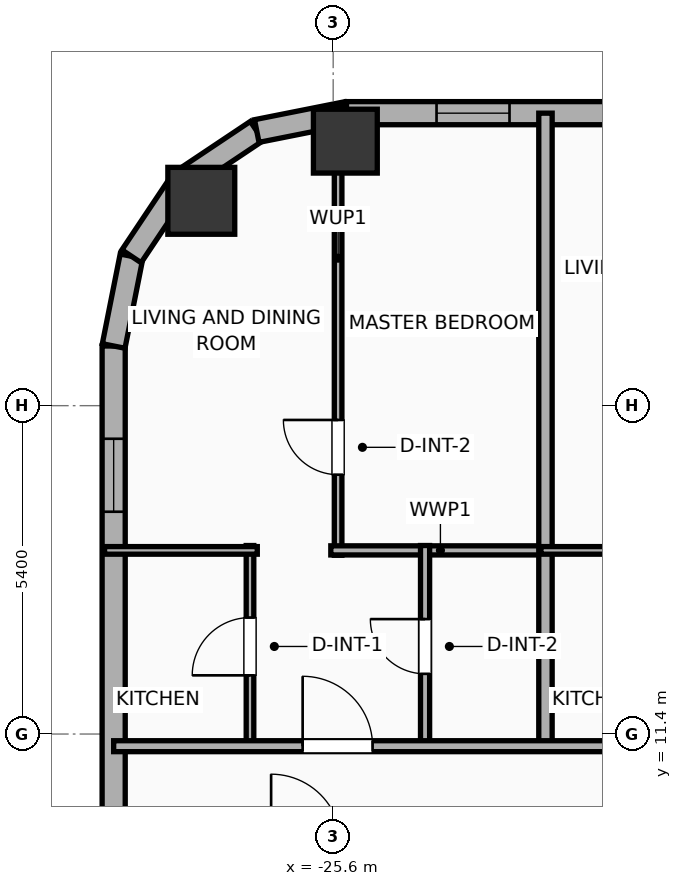
"""IFC4 building model, lengths in metres.
Left out: names, types, materials, properties, quantities, classifications, styles, units other than length and angle.
Written with IfcOpenShell. Run it as: python <this file> out.ifc"""

import sys

from ifc_helpers import new_model, si_unit, direction, frame, frame_2d, origin, origin_2d, place, context, subcontext, project, spatial, rectangle, hollow_rectangle, hollow_circle, extrude, element, fill, save


model = new_model("IFC4")
c1 = context("Model", 3, precision=1e-05, world=origin(), true_north=direction((0.0, 1.0)))
c2 = subcontext(c1, "Body", "Model", "MODEL_VIEW")
j1 = project(units=[si_unit("LENGTHUNIT", "METRE"), si_unit("PLANEANGLEUNIT", "RADIAN")], contexts=[c1])
p1 = place(None, origin())
s1 = spatial("IfcSite", under=j1, at=p1, CompositionType="ELEMENT")
p2 = place(p1, origin())
s2 = spatial("IfcBuilding", under=s1, at=p2, CompositionType="ELEMENT")
p3 = place(p2, frame((0.0, 0.0, 120.9)))
s3 = spatial("IfcBuildingStorey", under=s2, at=p3, CompositionType="ELEMENT", Elevation=120.9)
p4 = place(p3, frame((-25.4, 21.15, 0.0), z_axis=(0.0, 0.0, 1.0), x_axis=(1.0, 0.0, 0.0)))
e1 = element("IfcColumn", 1, at=p4, inside=s3, PredefinedType="COLUMN", context=c2, shape_type="SweptSolid", body=[
    extrude(hollow_rectangle(XDim=1.05, YDim=1.05, WallThickness=0.036, at=origin_2d()), origin(), (0.0, 0.0, 1.0), 3.9),
])
p5 = place(p3, frame((-27.769, 20.169, 0.0), z_axis=(0.0, 0.0, 1.0), x_axis=(1.0, 0.0, 0.0)))
e2 = element("IfcColumn", 2, at=p5, inside=s3, PredefinedType="COLUMN", context=c2, shape_type="SweptSolid", body=[
    extrude(hollow_circle(Radius=0.55, WallThickness=0.036, at=origin_2d()), origin(), (0.0, 0.0, 1.0), 3.9),
])
p6 = place(p3, frame((-29.21, -16.581, 0.0), z_axis=(0.0, 0.0, 1.0), x_axis=(0.0, 1.0, 0.0)))
e3 = element("IfcWall", 3, at=p6, inside=s3, PredefinedType="ELEMENTEDWALL", context=c2, shape_type="SweptSolid", body=[
    extrude(rectangle(XDim=34.363, YDim=0.38, at=frame_2d((17.181, 0.0))), origin(), (0.0, 0.0, 1.0), 3.65),
])
p7 = place(p6, frame((31.637, 0.0, 0.75)))
e4 = element("IfcOpeningElement", 4, at=p7, cuts=e3, PredefinedType="OPENING", context=c2, shape_type="SweptSolid", body=[
    extrude(rectangle(XDim=1.2, YDim=2.05, at=frame_2d((0.6, 1.025))), frame((0.0, 0.2, 0.0), z_axis=(0.0, -1.0, 0.0), x_axis=(1.0, 0.0, 0.0)), (0.0, 0.0, 1.0), 0.4),
])
p8 = place(p6, frame((20.876, 0.0, 0.75)))
e5 = element("IfcOpeningElement", 5, at=p8, cuts=e3, PredefinedType="OPENING", context=c2, shape_type="SweptSolid", body=[
    extrude(rectangle(XDim=1.2, YDim=2.05, at=frame_2d((0.6, 1.025))), frame((0.0, 0.2, 0.0), z_axis=(0.0, -1.0, 0.0), x_axis=(1.0, 0.0, 0.0)), (0.0, 0.0, 1.0), 0.4),
])
p9 = place(p6, frame((11.226, 0.0, 0.75)))
e6 = element("IfcOpeningElement", 6, at=p9, cuts=e3, PredefinedType="OPENING", context=c2, shape_type="SweptSolid", body=[
    extrude(rectangle(XDim=1.2, YDim=2.05, at=frame_2d((0.6, 1.025))), frame((0.0, 0.2, 0.0), z_axis=(0.0, -1.0, 0.0), x_axis=(1.0, 0.0, 0.0)), (0.0, 0.0, 1.0), 0.4),
])
p10 = place(p3, frame((-29.21, 17.781, 0.0), z_axis=(0.0, 0.0, 1.0), x_axis=(0.195086038585, 0.980786132421, 0.0)))
e7 = element("IfcWall", 7, at=p10, inside=s3, PredefinedType="ELEMENTEDWALL", context=c2, shape_type="SweptSolid", body=[
    extrude(rectangle(XDim=1.504, YDim=0.38, at=frame_2d((0.752, 0.0))), origin(), (0.0, 0.0, 1.0), 3.65),
])
p11 = place(p3, frame((-28.917, 19.257, 0.0), z_axis=(0.0, 0.0, 1.0), x_axis=(0.555610286119, 0.831442848281, 0.0)))
e8 = element("IfcWall", 8, at=p11, inside=s3, PredefinedType="ELEMENTEDWALL", context=c2, shape_type="SweptSolid", body=[
    extrude(rectangle(XDim=1.485, YDim=0.38, at=frame_2d((0.743, 0.0))), origin(), (0.0, 0.0, 1.0), 3.65),
])
p12 = place(p3, frame((-28.091, 20.491, 0.0), z_axis=(0.0, 0.0, 1.0), x_axis=(0.831468045563, 0.555572577804, 0.0)))
e9 = element("IfcWall", 9, at=p12, inside=s3, PredefinedType="ELEMENTEDWALL", context=c2, shape_type="SweptSolid", body=[
    extrude(rectangle(XDim=1.485, YDim=0.38, at=frame_2d((0.742, 0.0))), origin(), (0.0, 0.0, 1.0), 3.65),
])
p13 = place(p3, frame((-26.857, 21.316, 0.0), z_axis=(0.0, 0.0, 1.0), x_axis=(0.980755066645, 0.195242155415, 0.0)))
e10 = element("IfcWall", 10, at=p13, inside=s3, PredefinedType="ELEMENTEDWALL", context=c2, shape_type="SweptSolid", body=[
    extrude(rectangle(XDim=1.504, YDim=0.38, at=frame_2d((0.752, 0.0))), origin(), (0.0, 0.0, 1.0), 3.65),
])
p14 = place(p3, frame((-25.381, 21.61, 0.0), z_axis=(0.0, 0.0, 1.0), x_axis=(1.0, 0.0, 0.0)))
e11 = element("IfcWall", 11, at=p14, inside=s3, PredefinedType="ELEMENTEDWALL", context=c2, shape_type="SweptSolid", body=[
    extrude(rectangle(XDim=54.763, YDim=0.38, at=frame_2d((27.381, 0.0))), origin(), (0.0, 0.0, 1.0), 3.65),
])
p15 = place(p14, frame((7.295, 0.0, 0.75)))
e12 = element("IfcOpeningElement", 12, at=p15, cuts=e11, PredefinedType="OPENING", context=c2, shape_type="SweptSolid", body=[
    extrude(rectangle(XDim=2.4, YDim=2.1, at=frame_2d((1.2, 1.05))), frame((0.0, 0.2, 0.0), z_axis=(0.0, -1.0, 0.0), x_axis=(1.0, 0.0, 0.0)), (0.0, 0.0, 1.0), 0.4),
])
p16 = place(p14, frame((17.686, 0.0, 0.75)))
e13 = element("IfcOpeningElement", 13, at=p16, cuts=e11, PredefinedType="OPENING", context=c2, shape_type="SweptSolid", body=[
    extrude(rectangle(XDim=2.4, YDim=2.1, at=frame_2d((1.2, 1.05))), frame((0.0, 0.2, 0.0), z_axis=(0.0, -1.0, 0.0), x_axis=(1.0, 0.0, 0.0)), (0.0, 0.0, 1.0), 0.4),
])
p17 = place(p14, frame((45.867, 0.0, 0.75)))
e14 = element("IfcOpeningElement", 14, at=p17, cuts=e11, PredefinedType="OPENING", context=c2, shape_type="SweptSolid", body=[
    extrude(rectangle(XDim=2.4, YDim=2.1, at=frame_2d((1.2, 1.05))), frame((0.0, 0.2, 0.0), z_axis=(0.0, -1.0, 0.0), x_axis=(1.0, 0.0, 0.0)), (0.0, 0.0, 1.0), 0.4),
])
p18 = place(p14, frame((1.481, 0.0, 0.75)))
e15 = element("IfcOpeningElement", 15, at=p18, cuts=e11, PredefinedType="OPENING", context=c2, shape_type="SweptSolid", body=[
    extrude(rectangle(XDim=1.2, YDim=2.05, at=frame_2d((0.6, 1.025))), frame((0.0, 0.2, 0.0), z_axis=(0.0, -1.0, 0.0), x_axis=(1.0, 0.0, 0.0)), (0.0, 0.0, 1.0), 0.4),
])
p19 = place(p14, frame((4.522, 0.0, 0.75)))
e16 = element("IfcOpeningElement", 16, at=p19, cuts=e11, PredefinedType="OPENING", context=c2, shape_type="SweptSolid", body=[
    extrude(rectangle(XDim=1.2, YDim=2.05, at=frame_2d((0.6, 1.025))), frame((0.0, 0.2, 0.0), z_axis=(0.0, -1.0, 0.0), x_axis=(1.0, 0.0, 0.0)), (0.0, 0.0, 1.0), 0.4),
])
p20 = place(p14, frame((11.696, 0.0, 0.75)))
e17 = element("IfcOpeningElement", 17, at=p20, cuts=e11, PredefinedType="OPENING", context=c2, shape_type="SweptSolid", body=[
    extrude(rectangle(XDim=1.2, YDim=2.05, at=frame_2d((0.6, 1.025))), frame((0.0, 0.2, 0.0), z_axis=(0.0, -1.0, 0.0), x_axis=(1.0, 0.0, 0.0)), (0.0, 0.0, 1.0), 0.4),
])
p21 = place(p14, frame((15.076, 0.0, 0.75)))
e18 = element("IfcOpeningElement", 18, at=p21, cuts=e11, PredefinedType="OPENING", context=c2, shape_type="SweptSolid", body=[
    extrude(rectangle(XDim=1.2, YDim=2.05, at=frame_2d((0.6, 1.025))), frame((0.0, 0.2, 0.0), z_axis=(0.0, -1.0, 0.0), x_axis=(1.0, 0.0, 0.0)), (0.0, 0.0, 1.0), 0.4),
])
p22 = place(p14, frame((22.676, 0.0, 0.75)))
e19 = element("IfcOpeningElement", 19, at=p22, cuts=e11, PredefinedType="OPENING", context=c2, shape_type="SweptSolid", body=[
    extrude(rectangle(XDim=1.2, YDim=2.05, at=frame_2d((0.6, 1.025))), frame((0.0, 0.2, 0.0), z_axis=(0.0, -1.0, 0.0), x_axis=(1.0, 0.0, 0.0)), (0.0, 0.0, 1.0), 0.4),
])
p23 = place(p14, frame((25.576, 0.0, 0.75)))
e20 = element("IfcOpeningElement", 20, at=p23, cuts=e11, PredefinedType="OPENING", context=c2, shape_type="SweptSolid", body=[
    extrude(rectangle(XDim=1.2, YDim=2.05, at=frame_2d((0.6, 1.025))), frame((0.0, 0.2, 0.0), z_axis=(0.0, -1.0, 0.0), x_axis=(1.0, 0.0, 0.0)), (0.0, 0.0, 1.0), 0.4),
])
p24 = place(p14, frame((29.076, 0.0, 0.75)))
e21 = element("IfcOpeningElement", 21, at=p24, cuts=e11, PredefinedType="OPENING", context=c2, shape_type="SweptSolid", body=[
    extrude(rectangle(XDim=1.2, YDim=2.05, at=frame_2d((0.6, 1.025))), frame((0.0, 0.2, 0.0), z_axis=(0.0, -1.0, 0.0), x_axis=(1.0, 0.0, 0.0)), (0.0, 0.0, 1.0), 0.4),
])
p25 = place(p14, frame((33.591, 0.0, 0.75)))
e22 = element("IfcOpeningElement", 22, at=p25, cuts=e11, PredefinedType="OPENING", context=c2, shape_type="SweptSolid", body=[
    extrude(rectangle(XDim=0.85, YDim=2.05, at=frame_2d((0.425, 1.025))), frame((0.0, 0.2, 0.0), z_axis=(0.0, -1.0, 0.0), x_axis=(1.0, 0.0, 0.0)), (0.0, 0.0, 1.0), 0.4),
])
p26 = place(p14, frame((36.076, 0.0, 0.75)))
e23 = element("IfcOpeningElement", 23, at=p26, cuts=e11, PredefinedType="OPENING", context=c2, shape_type="SweptSolid", body=[
    extrude(rectangle(XDim=1.2, YDim=2.05, at=frame_2d((0.6, 1.025))), frame((0.0, 0.2, 0.0), z_axis=(0.0, -1.0, 0.0), x_axis=(1.0, 0.0, 0.0)), (0.0, 0.0, 1.0), 0.4),
])
p27 = place(p14, frame((39.446, 0.0, 0.75)))
e24 = element("IfcOpeningElement", 24, at=p27, cuts=e11, PredefinedType="OPENING", context=c2, shape_type="SweptSolid", body=[
    extrude(rectangle(XDim=1.2, YDim=2.05, at=frame_2d((0.6, 1.025))), frame((0.0, 0.2, 0.0), z_axis=(0.0, -1.0, 0.0), x_axis=(1.0, 0.0, 0.0)), (0.0, 0.0, 1.0), 0.4),
])
p28 = place(p14, frame((42.27, 0.0, 0.75)))
e25 = element("IfcOpeningElement", 25, at=p28, cuts=e11, PredefinedType="OPENING", context=c2, shape_type="SweptSolid", body=[
    extrude(rectangle(XDim=0.85, YDim=2.05, at=frame_2d((0.425, 1.025))), frame((0.0, 0.2, 0.0), z_axis=(0.0, -1.0, 0.0), x_axis=(1.0, 0.0, 0.0)), (0.0, 0.0, 1.0), 0.4),
])
p29 = place(p14, frame((49.554, 0.0, 0.75)))
e26 = element("IfcOpeningElement", 26, at=p29, cuts=e11, PredefinedType="OPENING", context=c2, shape_type="SweptSolid", body=[
    extrude(rectangle(XDim=1.2, YDim=2.05, at=frame_2d((0.6, 1.025))), frame((0.0, 0.2, 0.0), z_axis=(0.0, -1.0, 0.0), x_axis=(1.0, 0.0, 0.0)), (0.0, 0.0, 1.0), 0.4),
])
p30 = place(p14, frame((52.266, 0.0, 0.75)))
e27 = element("IfcOpeningElement", 27, at=p30, cuts=e11, PredefinedType="OPENING", context=c2, shape_type="SweptSolid", body=[
    extrude(rectangle(XDim=1.2, YDim=2.05, at=frame_2d((0.6, 1.025))), frame((0.0, 0.2, 0.0), z_axis=(0.0, -1.0, 0.0), x_axis=(1.0, 0.0, 0.0)), (0.0, 0.0, 1.0), 0.4),
])
p31 = place(p3, frame((-25.519, 14.34, 0.0), z_axis=(0.0, 0.0, 1.0), x_axis=(0.0, 1.0, 0.0)))
e28 = element("IfcWall", 28, at=p31, inside=s3, PredefinedType="PARTITIONING", context=c2, shape_type="SweptSolid", body=[
    extrude(rectangle(XDim=7.396, YDim=0.125, at=frame_2d((3.698, 0.0))), origin(), (0.0, 0.0, 1.0), 3.65),
])
p32 = place(p31, frame((1.325, 0.0, 0.0)))
e29 = element("IfcOpeningElement", 29, at=p32, cuts=e28, PredefinedType="OPENING", context=c2, shape_type="SweptSolid", body=[
    extrude(rectangle(XDim=0.9, YDim=2.05, at=frame_2d((0.45, 1.025))), frame((0.0, 0.073, 0.0), z_axis=(0.0, -1.0, 0.0), x_axis=(1.0, 0.0, 0.0)), (0.0, 0.0, 1.0), 0.145),
])
p33 = place(p3, frame((-25.639, 14.42, 0.0), z_axis=(0.0, 0.0, 1.0), x_axis=(1.0, 0.0, 0.0)))
e30 = element("IfcWall", 30, at=p33, inside=s3, PredefinedType="PLUMBINGWALL", context=c2, shape_type="SweptSolid", body=[
    extrude(rectangle(XDim=3.605, YDim=0.15, at=frame_2d((1.802, 0.0))), origin(), (0.0, 0.0, 1.0), 3.65),
])
p34 = place(p3, frame((-26.968, 11.18, 0.0), z_axis=(0.0, 0.0, 1.0), x_axis=(0.0, 1.0, 0.0)))
e31 = element("IfcWall", 31, at=p34, inside=s3, PredefinedType="PARTITIONING", context=c2, shape_type="SweptSolid", body=[
    extrude(rectangle(XDim=3.32, YDim=0.125, at=frame_2d((1.66, 0.0))), origin(), (0.0, 0.0, 1.0), 3.65),
])
p35 = place(p34, frame((1.185, 0.0, 0.0)))
e32 = element("IfcOpeningElement", 32, at=p35, cuts=e31, PredefinedType="OPENING", context=c2, shape_type="SweptSolid", body=[
    extrude(rectangle(XDim=0.95, YDim=2.05, at=frame_2d((0.475, 1.025))), frame((0.0, 0.073, 0.0), z_axis=(0.0, -1.0, 0.0), x_axis=(1.0, 0.0, 0.0)), (0.0, 0.0, 1.0), 0.145),
])
p36 = place(p3, frame((-29.36, 14.42, 0.0), z_axis=(0.0, 0.0, 1.0), x_axis=(1.0, 0.0, 0.0)))
e33 = element("IfcWall", 33, at=p36, inside=s3, PredefinedType="PARTITIONING", context=c2, shape_type="SweptSolid", body=[
    extrude(rectangle(XDim=2.512, YDim=0.125, at=frame_2d((1.256, 0.0))), origin(), (0.0, 0.0, 1.0), 3.65),
])
p37 = place(p3, frame((-24.089, 11.18, 0.0), z_axis=(0.0, 0.0, 1.0), x_axis=(0.0, 1.0, 0.0)))
e34 = element("IfcWall", 34, at=p37, inside=s3, PredefinedType="PLUMBINGWALL", context=c2, shape_type="SweptSolid", body=[
    extrude(rectangle(XDim=3.32, YDim=0.15, at=frame_2d((1.66, 0.0))), origin(), (0.0, 0.0, 1.0), 3.65),
])
p38 = place(p37, frame((1.21, 0.0, 0.0)))
e35 = element("IfcOpeningElement", 35, at=p38, cuts=e34, PredefinedType="OPENING", context=c2, shape_type="SweptSolid", body=[
    extrude(rectangle(XDim=0.9, YDim=2.05, at=frame_2d((0.45, 1.025))), frame((0.0, 0.085, 0.0), z_axis=(0.0, -1.0, 0.0), x_axis=(1.0, 0.0, 0.0)), (0.0, 0.0, 1.0), 0.17),
])
p39 = place(p3, frame((-22.109, 11.12, 0.0), z_axis=(0.0, 0.0, 1.0), x_axis=(0.0, 1.0, 0.0)))
e36 = element("IfcWall", 36, at=p39, inside=s3, PredefinedType="PARTITIONING", context=c2, shape_type="SweptSolid", body=[
    extrude(rectangle(XDim=10.49, YDim=0.22, at=frame_2d((5.245, 0.0))), origin(), (0.0, 0.0, 1.0), 3.65),
])
p40 = place(p3, frame((-22.184, 14.42, 0.0), z_axis=(0.0, 0.0, 1.0), x_axis=(1.0, 0.0, 0.0)))
e37 = element("IfcWall", 37, at=p40, inside=s3, PredefinedType="PARTITIONING", context=c2, shape_type="SweptSolid", body=[
    extrude(rectangle(XDim=2.505, YDim=0.125, at=frame_2d((1.252, 0.0))), origin(), (0.0, 0.0, 1.0), 3.65),
])
p41 = place(p3, frame((-29.21, 11.2, 0.0), z_axis=(0.0, 0.0, 1.0), x_axis=(1.0, 0.0, 0.0)))
e38 = element("IfcWall", 38, at=p41, inside=s3, PredefinedType="PARTITIONING", context=c2, shape_type="SweptSolid", body=[
    extrude(rectangle(XDim=62.42, YDim=0.18, at=frame_2d((31.21, 0.0))), origin(), (0.0, 0.0, 1.0), 3.65),
])
p42 = place(p41, frame((3.108, 0.0, 0.0)))
e39 = element("IfcOpeningElement", 39, at=p42, cuts=e38, PredefinedType="OPENING", context=c2, shape_type="SweptSolid", body=[
    extrude(rectangle(XDim=1.15, YDim=2.05, at=frame_2d((0.575, 1.025))), frame((0.0, 0.1, 0.0), z_axis=(0.0, -1.0, 0.0), x_axis=(1.0, 0.0, 0.0)), (0.0, 0.0, 1.0), 0.2),
])
p43 = place(p41, frame((10.242, 0.0, 0.0)))
e40 = element("IfcOpeningElement", 40, at=p43, cuts=e38, PredefinedType="OPENING", context=c2, shape_type="SweptSolid", body=[
    extrude(rectangle(XDim=1.15, YDim=2.05, at=frame_2d((0.575, 1.025))), frame((0.0, 0.1, 0.0), z_axis=(0.0, -1.0, 0.0), x_axis=(1.0, 0.0, 0.0)), (0.0, 0.0, 1.0), 0.2),
])
p44 = place(p41, frame((17.427, 0.0, 0.0)))
e41 = element("IfcOpeningElement", 41, at=p44, cuts=e38, PredefinedType="OPENING", context=c2, shape_type="SweptSolid", body=[
    extrude(rectangle(XDim=0.9, YDim=2.05, at=frame_2d((0.45, 1.025))), frame((0.0, 0.1, 0.0), z_axis=(0.0, -1.0, 0.0), x_axis=(1.0, 0.0, 0.0)), (0.0, 0.0, 1.0), 0.2),
])
p45 = place(p41, frame((24.424, 0.0, 0.0)))
e42 = element("IfcOpeningElement", 42, at=p45, cuts=e38, PredefinedType="OPENING", context=c2, shape_type="SweptSolid", body=[
    extrude(rectangle(XDim=0.9, YDim=2.05, at=frame_2d((0.45, 1.025))), frame((0.0, 0.1, 0.0), z_axis=(0.0, -1.0, 0.0), x_axis=(1.0, 0.0, 0.0)), (0.0, 0.0, 1.0), 0.2),
])
p46 = place(p41, frame((31.428, 0.0, 0.0)))
e43 = element("IfcOpeningElement", 43, at=p46, cuts=e38, PredefinedType="OPENING", context=c2, shape_type="SweptSolid", body=[
    extrude(rectangle(XDim=0.9, YDim=2.05, at=frame_2d((0.45, 1.025))), frame((0.0, 0.1, 0.0), z_axis=(0.0, -1.0, 0.0), x_axis=(1.0, 0.0, 0.0)), (0.0, 0.0, 1.0), 0.2),
])
p47 = place(p41, frame((38.425, 0.0, 0.0)))
e44 = element("IfcOpeningElement", 44, at=p47, cuts=e38, PredefinedType="OPENING", context=c2, shape_type="SweptSolid", body=[
    extrude(rectangle(XDim=0.9, YDim=2.05, at=frame_2d((0.45, 1.025))), frame((0.0, 0.1, 0.0), z_axis=(0.0, -1.0, 0.0), x_axis=(1.0, 0.0, 0.0)), (0.0, 0.0, 1.0), 0.2),
])
p48 = place(p41, frame((45.298, 0.0, 0.0)))
e45 = element("IfcOpeningElement", 45, at=p48, cuts=e38, PredefinedType="OPENING", context=c2, shape_type="SweptSolid", body=[
    extrude(rectangle(XDim=0.9, YDim=2.05, at=frame_2d((0.45, 1.025))), frame((0.0, 0.1, 0.0), z_axis=(0.0, -1.0, 0.0), x_axis=(1.0, 0.0, 0.0)), (0.0, 0.0, 1.0), 0.2),
])
p49 = place(p41, frame((52.033, 0.0, 0.0)))
e46 = element("IfcOpeningElement", 46, at=p49, cuts=e38, PredefinedType="OPENING", context=c2, shape_type="SweptSolid", body=[
    extrude(rectangle(XDim=0.9, YDim=2.05, at=frame_2d((0.45, 1.025))), frame((0.0, 0.1, 0.0), z_axis=(0.0, -1.0, 0.0), x_axis=(1.0, 0.0, 0.0)), (0.0, 0.0, 1.0), 0.2),
])
p50 = place(p41, frame((58.805, 0.0, 0.0)))
e47 = element("IfcOpeningElement", 47, at=p50, cuts=e38, PredefinedType="OPENING", context=c2, shape_type="SweptSolid", body=[
    extrude(rectangle(XDim=0.9, YDim=2.05, at=frame_2d((0.45, 1.025))), frame((0.0, 0.1, 0.0), z_axis=(0.0, -1.0, 0.0), x_axis=(1.0, 0.0, 0.0)), (0.0, 0.0, 1.0), 0.2),
])
p51 = place(p7, origin())
e48 = element("IfcWindow", 48, at=p51, inside=s3, PartitioningType="SINGLE_PANEL", PredefinedType="WINDOW", context=c2, shape_type="SweptSolid", body=[
    extrude(rectangle(XDim=1.2, YDim=2.05, at=frame_2d((0.6, 1.025))), frame((0.0, 0.03, 0.0), z_axis=(0.0, -1.0, 0.0), x_axis=(1.0, 0.0, 0.0)), (0.0, 0.0, 1.0), 0.06),
])
fill(e4, e48)
p52 = place(p18, origin())
e49 = element("IfcWindow", 49, at=p52, inside=s3, PartitioningType="SINGLE_PANEL", PredefinedType="WINDOW", context=c2, shape_type="SweptSolid", body=[
    extrude(rectangle(XDim=1.2, YDim=2.05, at=frame_2d((0.6, 1.025))), frame((0.0, 0.03, 0.0), z_axis=(0.0, -1.0, 0.0), x_axis=(1.0, 0.0, 0.0)), (0.0, 0.0, 1.0), 0.06),
])
fill(e15, e49)
p53 = place(p32, origin())
e50 = element("IfcDoor", 50, at=p53, inside=s3, OperationType="SINGLE_SWING_RIGHT", PredefinedType="DOOR", context=c2, shape_type="SweptSolid", body=[
    extrude(rectangle(XDim=0.9, YDim=2.05, at=frame_2d((0.45, 1.025))), frame((0.0, 0.025, 0.0), z_axis=(0.0, -1.0, 0.0), x_axis=(1.0, 0.0, 0.0)), (0.0, 0.0, 1.0), 0.05),
])
fill(e29, e50)
p54 = place(p35, origin())
e51 = element("IfcDoor", 51, at=p54, inside=s3, OperationType="SINGLE_SWING_LEFT", PredefinedType="DOOR", context=c2, shape_type="SweptSolid", body=[
    extrude(rectangle(XDim=0.95, YDim=2.05, at=frame_2d((0.475, 1.025))), frame((0.0, 0.025, 0.0), z_axis=(0.0, -1.0, 0.0), x_axis=(1.0, 0.0, 0.0)), (0.0, 0.0, 1.0), 0.05),
])
fill(e32, e51)
p55 = place(p38, origin())
e52 = element("IfcDoor", 52, at=p55, inside=s3, OperationType="SINGLE_SWING_RIGHT", PredefinedType="DOOR", context=c2, shape_type="SweptSolid", body=[
    extrude(rectangle(XDim=0.9, YDim=2.05, at=frame_2d((0.45, 1.025))), frame((0.0, 0.025, 0.0), z_axis=(0.0, -1.0, 0.0), x_axis=(1.0, 0.0, 0.0)), (0.0, 0.0, 1.0), 0.05),
])
fill(e35, e52)
p56 = place(p42, origin())
e53 = element("IfcDoor", 53, at=p56, inside=s3, OperationType="SINGLE_SWING_LEFT", PredefinedType="DOOR", context=c2, shape_type="SweptSolid", body=[
    extrude(rectangle(XDim=1.15, YDim=2.05, at=frame_2d((0.575, 1.025))), frame((0.0, 0.025, 0.0), z_axis=(0.0, -1.0, 0.0), x_axis=(1.0, 0.0, 0.0)), (0.0, 0.0, 1.0), 0.05),
])
fill(e39, e53)
save(model, sys.argv[1])
